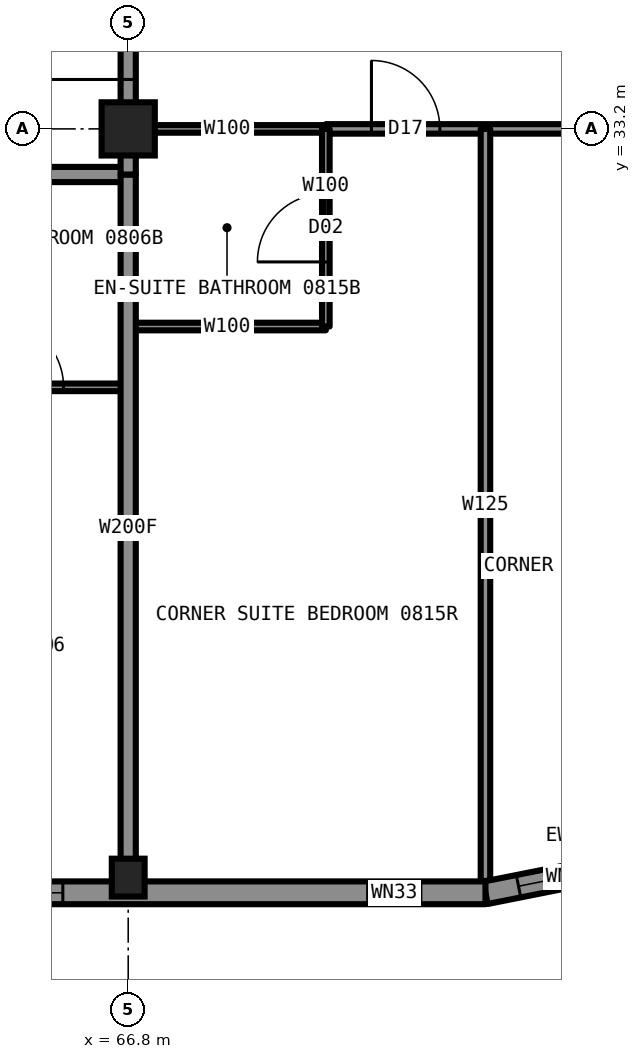
"""IFC4 building model, lengths in metres.
Left out: names, types, materials, properties, quantities, classifications, styles, units other than length and angle.
Written with IfcOpenShell. Run it as: python <this file> out.ifc"""

import sys

from ifc_helpers import new_model, si_unit, direction, frame, frame_2d, origin, origin_2d, place, context, subcontext, project, spatial, rectangle, hollow_rectangle, i_section, extrude, element, fill, save


model = new_model("IFC4")
c1 = context("Model", 3, precision=1e-05, world=origin(), true_north=direction((0.0, 1.0)))
c2 = subcontext(c1, "Body", "Model", "MODEL_VIEW")
j1 = project(units=[si_unit("LENGTHUNIT", "METRE"), si_unit("PLANEANGLEUNIT", "RADIAN")], contexts=[c1])
p1 = place(None, origin())
s1 = spatial("IfcSite", under=j1, at=p1, CompositionType="ELEMENT")
p2 = place(p1, origin())
s2 = spatial("IfcBuilding", under=s1, at=p2, CompositionType="ELEMENT")
p3 = place(p2, frame((0.0, 0.0, 28.5)))
s3 = spatial("IfcBuildingStorey", under=s2, at=p3, CompositionType="ELEMENT", Elevation=28.5)
p4 = place(p3, frame((66.8, 23.35, 0.0), z_axis=(0.0, 0.0, 1.0), x_axis=(1.0, 0.0, 0.0)))
e1 = element("IfcColumn", 1, at=p4, inside=s3, PredefinedType="COLUMN", context=c2, shape_type="SweptSolid", body=[
    extrude(i_section(OverallWidth=0.432, OverallDepth=0.498, WebThickness=0.056, FlangeThickness=0.089, at=origin_2d()), origin(), (0.0, 0.0, 1.0), 3.5),
])
p5 = place(p3, frame((66.8, 33.2, 0.0), z_axis=(0.0, 0.0, 1.0), x_axis=(1.0, 0.0, 0.0)))
e2 = element("IfcColumn", 2, at=p5, inside=s3, PredefinedType="COLUMN", context=c2, shape_type="SweptSolid", body=[
    extrude(hollow_rectangle(XDim=0.7, YDim=0.7, WallThickness=0.06, at=origin_2d()), origin(), (0.0, 0.0, 1.0), 3.5),
])
p6 = place(p3, frame((66.8, 33.2, 0.0), z_axis=(0.0, 0.0, 1.0), x_axis=(1.0, 0.0, 0.0)))
e3 = element("IfcWall", 3, at=p6, inside=s3, PredefinedType="PARTITIONING", context=c2, shape_type="SweptSolid", body=[
    extrude(rectangle(XDim=2.6, YDim=0.1, at=frame_2d((1.3, 0.0))), origin(), (0.0, 0.0, 1.0), 2.573),
])
p7 = place(p3, frame((69.4, 33.2, 0.0), z_axis=(0.0, 0.0, 1.0), x_axis=(1.0, 0.0, 0.0)))
e4 = element("IfcWall", 4, at=p7, inside=s3, PredefinedType="PARTITIONING", context=c2, shape_type="SweptSolid", body=[
    extrude(rectangle(XDim=7.3, YDim=0.125, at=frame_2d((3.65, 0.0))), origin(), (0.0, 0.0, 1.0), 2.573),
])
p8 = place(p7, frame((0.6, 0.0, 0.0)))
e5 = element("IfcOpeningElement", 5, at=p8, cuts=e4, PredefinedType="OPENING", context=c2, shape_type="SweptSolid", body=[
    extrude(rectangle(XDim=0.9, YDim=2.2, at=frame_2d((0.45, 1.1))), frame((0.0, 0.073, 0.0), z_axis=(0.0, -1.0, 0.0), x_axis=(1.0, 0.0, 0.0)), (0.0, 0.0, 1.0), 0.145),
])
p9 = place(p7, frame((4.4, 0.0, 0.0)))
e6 = element("IfcOpeningElement", 6, at=p9, cuts=e4, PredefinedType="OPENING", context=c2, shape_type="SweptSolid", body=[
    extrude(rectangle(XDim=0.9, YDim=2.2, at=frame_2d((0.45, 1.1))), frame((0.0, 0.073, 0.0), z_axis=(0.0, -1.0, 0.0), x_axis=(1.0, 0.0, 0.0)), (0.0, 0.0, 1.0), 0.145),
])
p10 = place(p3, frame((43.2, 32.6, 0.0), z_axis=(0.0, 0.0, 1.0), x_axis=(1.0, 0.0, 0.0)))
e7 = element("IfcWall", 7, at=p10, inside=s3, PredefinedType="PARTITIONING", context=c2, shape_type="SweptSolid", body=[
    extrude(rectangle(XDim=23.6, YDim=0.2, at=frame_2d((11.8, 0.0))), origin(), (0.0, 0.0, 1.0), 3.33),
])
p11 = place(p10, frame((1.85, 0.0, 0.0)))
e8 = element("IfcOpeningElement", 8, at=p11, cuts=e7, PredefinedType="OPENING", context=c2, shape_type="SweptSolid", body=[
    extrude(rectangle(XDim=1.1, YDim=2.2, at=frame_2d((0.55, 1.1))), frame((0.0, 0.11, 0.0), z_axis=(0.0, -1.0, 0.0), x_axis=(1.0, 0.0, 0.0)), (0.0, 0.0, 1.0), 0.22),
])
p12 = place(p10, frame((14.56, 0.0, 0.0)))
e9 = element("IfcOpeningElement", 9, at=p12, cuts=e7, PredefinedType="OPENING", context=c2, shape_type="SweptSolid", body=[
    extrude(rectangle(XDim=1.0, YDim=2.2, at=frame_2d((0.5, 1.1))), frame((0.0, 0.11, 0.0), z_axis=(0.0, -1.0, 0.0), x_axis=(1.0, 0.0, 0.0)), (0.0, 0.0, 1.0), 0.22),
])
p13 = place(p10, frame((19.28, 0.0, 0.0)))
e10 = element("IfcOpeningElement", 10, at=p13, cuts=e7, PredefinedType="OPENING", context=c2, shape_type="SweptSolid", body=[
    extrude(rectangle(XDim=1.0, YDim=2.2, at=frame_2d((0.5, 1.1))), frame((0.0, 0.11, 0.0), z_axis=(0.0, -1.0, 0.0), x_axis=(1.0, 0.0, 0.0)), (0.0, 0.0, 1.0), 0.22),
])
p14 = place(p3, frame((66.8, 30.6, 0.0), z_axis=(0.0, 0.0, 1.0), x_axis=(1.0, 0.0, 0.0)))
e11 = element("IfcWall", 11, at=p14, inside=s3, PredefinedType="PARTITIONING", context=c2, shape_type="SweptSolid", body=[
    extrude(rectangle(XDim=2.6, YDim=0.1, at=frame_2d((1.3, 0.0))), origin(), (0.0, 0.0, 1.0), 3.33),
])
p15 = place(p3, frame((64.2, 29.8, 0.0), z_axis=(0.0, 0.0, 1.0), x_axis=(1.0, 0.0, 0.0)))
e12 = element("IfcWall", 12, at=p15, inside=s3, PredefinedType="PARTITIONING", context=c2, shape_type="SweptSolid", body=[
    extrude(rectangle(XDim=2.6, YDim=0.1, at=frame_2d((1.3, 0.0))), origin(), (0.0, 0.0, 1.0), 3.33),
])
p16 = place(p15, frame((0.85, 0.0, 0.0)))
e13 = element("IfcOpeningElement", 13, at=p16, cuts=e12, PredefinedType="OPENING", context=c2, shape_type="SweptSolid", body=[
    extrude(rectangle(XDim=0.9, YDim=2.1, at=frame_2d((0.45, 1.05))), frame((0.0, 0.06, 0.0), z_axis=(0.0, -1.0, 0.0), x_axis=(1.0, 0.0, 0.0)), (0.0, 0.0, 1.0), 0.12),
])
p17 = place(p3, frame((66.8, 33.22, 0.0), z_axis=(0.0, 0.0, 1.0), x_axis=(0.0, 1.0, 0.0)))
e14 = element("IfcWall", 14, at=p17, inside=s3, PredefinedType="PARTITIONING", context=c2, shape_type="SweptSolid", body=[
    extrude(rectangle(XDim=23.56, YDim=0.2, at=frame_2d((11.78, 0.0))), origin(), (0.0, 0.0, 1.0), 3.33),
])
p18 = place(p17, frame((7.85, 0.0, 0.0)))
e15 = element("IfcOpeningElement", 15, at=p18, cuts=e14, PredefinedType="OPENING", context=c2, shape_type="SweptSolid", body=[
    extrude(rectangle(XDim=1.0, YDim=2.2, at=frame_2d((0.5, 1.1))), frame((0.0, 0.11, 0.0), z_axis=(0.0, -1.0, 0.0), x_axis=(1.0, 0.0, 0.0)), (0.0, 0.0, 1.0), 0.22),
])
p19 = place(p17, frame((12.42, 0.0, 0.0)))
e16 = element("IfcOpeningElement", 16, at=p19, cuts=e14, PredefinedType="OPENING", context=c2, shape_type="SweptSolid", body=[
    extrude(rectangle(XDim=1.0, YDim=2.2, at=frame_2d((0.5, 1.1))), frame((0.0, 0.11, 0.0), z_axis=(0.0, -1.0, 0.0), x_axis=(1.0, 0.0, 0.0)), (0.0, 0.0, 1.0), 0.22),
])
p20 = place(p17, frame((21.83, 0.0, 0.0)))
e17 = element("IfcOpeningElement", 17, at=p20, cuts=e14, PredefinedType="OPENING", context=c2, shape_type="SweptSolid", body=[
    extrude(rectangle(XDim=1.1, YDim=2.2, at=frame_2d((0.55, 1.1))), frame((0.0, 0.11, 0.0), z_axis=(0.0, -1.0, 0.0), x_axis=(1.0, 0.0, 0.0)), (0.0, 0.0, 1.0), 0.22),
])
p21 = place(p17, frame((0.63, 0.0, 0.0)))
e18 = element("IfcOpeningElement", 18, at=p21, cuts=e14, PredefinedType="OPENING", context=c2, shape_type="SweptSolid", body=[
    extrude(rectangle(XDim=1.1, YDim=2.2, at=frame_2d((0.55, 1.1))), frame((0.0, 0.11, 0.0), z_axis=(0.0, -1.0, 0.0), x_axis=(1.0, 0.0, 0.0)), (0.0, 0.0, 1.0), 0.22),
])
p22 = place(p3, frame((66.8, 23.3, 0.0), z_axis=(0.0, 0.0, 1.0), x_axis=(0.0, 1.0, 0.0)))
e19 = element("IfcWall", 19, at=p22, inside=s3, PredefinedType="PARTITIONING", context=c2, shape_type="SweptSolid", body=[
    extrude(rectangle(XDim=9.3, YDim=0.2, at=frame_2d((4.65, 0.0))), origin(), (0.0, 0.0, 1.0), 2.573),
])
p23 = place(p3, frame((69.4, 30.6, 0.0), z_axis=(0.0, 0.0, 1.0), x_axis=(0.0, 1.0, 0.0)))
e20 = element("IfcWall", 20, at=p23, inside=s3, PredefinedType="PARTITIONING", context=c2, shape_type="SweptSolid", body=[
    extrude(rectangle(XDim=2.6, YDim=0.1, at=frame_2d((1.3, 0.0))), origin(), (0.0, 0.0, 1.0), 3.33),
])
p24 = place(p23, frame((0.85, 0.0, 0.0)))
e21 = element("IfcOpeningElement", 21, at=p24, cuts=e20, PredefinedType="OPENING", context=c2, shape_type="SweptSolid", body=[
    extrude(rectangle(XDim=0.9, YDim=2.1, at=frame_2d((0.45, 1.05))), frame((0.0, 0.06, 0.0), z_axis=(0.0, -1.0, 0.0), x_axis=(1.0, 0.0, 0.0)), (0.0, 0.0, 1.0), 0.12),
])
p25 = place(p3, frame((71.5, 23.306, 0.0), z_axis=(0.0, 0.0, 1.0), x_axis=(0.0, 1.0, 0.0)))
e22 = element("IfcWall", 22, at=p25, inside=s3, PredefinedType="PARTITIONING", context=c2, shape_type="SweptSolid", body=[
    extrude(rectangle(XDim=9.894, YDim=0.125, at=frame_2d((4.947, 0.0))), origin(), (0.0, 0.0, 1.0), 3.33),
])
p26 = place(p3, frame((71.5, 23.15, 0.0), z_axis=(0.0, 0.0, 1.0), x_axis=(0.980787050784, 0.195081421501, 0.0)))
e23 = element("IfcWall", 23, at=p26, inside=s3, PredefinedType="SOLIDWALL", context=c2, shape_type="SweptSolid", body=[
    extrude(rectangle(XDim=2.087, YDim=0.3, at=frame_2d((1.044, 0.0))), origin(), (0.0, 0.0, 1.0), 3.33),
])
p27 = place(p26, frame((0.444, 0.0, 0.5)))
e24 = element("IfcOpeningElement", 24, at=p27, cuts=e23, PredefinedType="OPENING", context=c2, shape_type="SweptSolid", body=[
    extrude(rectangle(XDim=0.8, YDim=1.1, at=frame_2d((0.4, 0.55))), frame((0.0, 0.16, 0.0), z_axis=(0.0, -1.0, 0.0), x_axis=(1.0, 0.0, 0.0)), (0.0, 0.0, 1.0), 0.32),
])
p28 = place(p3, frame((38.5, 23.15, 0.0), z_axis=(0.0, 0.0, 1.0), x_axis=(1.0, 0.0, 0.0)))
e25 = element("IfcWall", 25, at=p28, inside=s3, PredefinedType="SOLIDWALL", context=c2, shape_type="SweptSolid", body=[
    extrude(rectangle(XDim=33.0, YDim=0.3, at=frame_2d((16.5, 0.0))), origin(), (0.0, 0.0, 1.0), 2.83),
])
p29 = place(p28, frame((0.85, 0.0, 0.5)))
e26 = element("IfcOpeningElement", 26, at=p29, cuts=e25, PredefinedType="OPENING", context=c2, shape_type="SweptSolid", body=[
    extrude(rectangle(XDim=3.0, YDim=2.0, at=frame_2d((1.5, 1.0))), frame((0.0, 0.16, 0.0), z_axis=(0.0, -1.0, 0.0), x_axis=(1.0, 0.0, 0.0)), (0.0, 0.0, 1.0), 0.32),
])
p30 = place(p28, frame((5.56, 0.0, 0.5)))
e27 = element("IfcOpeningElement", 27, at=p30, cuts=e25, PredefinedType="OPENING", context=c2, shape_type="SweptSolid", body=[
    extrude(rectangle(XDim=3.0, YDim=2.0, at=frame_2d((1.5, 1.0))), frame((0.0, 0.16, 0.0), z_axis=(0.0, -1.0, 0.0), x_axis=(1.0, 0.0, 0.0)), (0.0, 0.0, 1.0), 0.32),
])
p31 = place(p28, frame((10.28, 0.0, 0.5)))
e28 = element("IfcOpeningElement", 28, at=p31, cuts=e25, PredefinedType="OPENING", context=c2, shape_type="SweptSolid", body=[
    extrude(rectangle(XDim=3.0, YDim=2.0, at=frame_2d((1.5, 1.0))), frame((0.0, 0.16, 0.0), z_axis=(0.0, -1.0, 0.0), x_axis=(1.0, 0.0, 0.0)), (0.0, 0.0, 1.0), 0.32),
])
p32 = place(p28, frame((15.0, 0.0, 0.5)))
e29 = element("IfcOpeningElement", 29, at=p32, cuts=e25, PredefinedType="OPENING", context=c2, shape_type="SweptSolid", body=[
    extrude(rectangle(XDim=3.0, YDim=2.0, at=frame_2d((1.5, 1.0))), frame((0.0, 0.16, 0.0), z_axis=(0.0, -1.0, 0.0), x_axis=(1.0, 0.0, 0.0)), (0.0, 0.0, 1.0), 0.32),
])
p33 = place(p28, frame((19.72, 0.0, 0.5)))
e30 = element("IfcOpeningElement", 30, at=p33, cuts=e25, PredefinedType="OPENING", context=c2, shape_type="SweptSolid", body=[
    extrude(rectangle(XDim=3.0, YDim=2.0, at=frame_2d((1.5, 1.0))), frame((0.0, 0.16, 0.0), z_axis=(0.0, -1.0, 0.0), x_axis=(1.0, 0.0, 0.0)), (0.0, 0.0, 1.0), 0.32),
])
p34 = place(p28, frame((24.44, 0.0, 0.5)))
e31 = element("IfcOpeningElement", 31, at=p34, cuts=e25, PredefinedType="OPENING", context=c2, shape_type="SweptSolid", body=[
    extrude(rectangle(XDim=3.0, YDim=2.0, at=frame_2d((1.5, 1.0))), frame((0.0, 0.16, 0.0), z_axis=(0.0, -1.0, 0.0), x_axis=(1.0, 0.0, 0.0)), (0.0, 0.0, 1.0), 0.32),
])
p35 = place(p28, frame((29.15, 0.0, 0.5)))
e32 = element("IfcOpeningElement", 32, at=p35, cuts=e25, PredefinedType="OPENING", context=c2, shape_type="SweptSolid", body=[
    extrude(rectangle(XDim=3.0, YDim=2.0, at=frame_2d((1.5, 1.0))), frame((0.0, 0.16, 0.0), z_axis=(0.0, -1.0, 0.0), x_axis=(1.0, 0.0, 0.0)), (0.0, 0.0, 1.0), 0.32),
])
p36 = place(p3, frame((66.8, 32.6, 0.0), z_axis=(0.0, 0.0, 1.0), x_axis=(0.0, 1.0, 0.0)))
e33 = element("IfcWall", 33, at=p36, inside=s3, PredefinedType="PARTITIONING", context=c2, shape_type="SweptSolid", body=[
    extrude(rectangle(XDim=0.62, YDim=0.2, at=frame_2d((0.31, 0.0))), origin(), (0.0, 0.0, 1.0), 2.573),
])
p37 = place(p16, origin())
e34 = element("IfcDoor", 34, at=p37, inside=s3, OperationType="SINGLE_SWING_RIGHT", PredefinedType="DOOR", context=c2, shape_type="SweptSolid", body=[
    extrude(rectangle(XDim=0.9, YDim=2.1, at=frame_2d((0.45, 1.05))), frame((0.0, 0.025, 0.0), z_axis=(0.0, -1.0, 0.0), x_axis=(1.0, 0.0, 0.0)), (0.0, 0.0, 1.0), 0.05),
])
fill(e13, e34)
p38 = place(p21, origin())
e35 = element("IfcDoor", 35, at=p38, inside=s3, OperationType="SINGLE_SWING_LEFT", PredefinedType="DOOR", context=c2, shape_type="SweptSolid", body=[
    extrude(rectangle(XDim=1.1, YDim=2.2, at=frame_2d((0.55, 1.1))), frame((0.0, 0.025, 0.0), z_axis=(0.0, -1.0, 0.0), x_axis=(1.0, 0.0, 0.0)), (0.0, 0.0, 1.0), 0.05),
])
fill(e18, e35)
p39 = place(p24, origin())
e36 = element("IfcDoor", 36, at=p39, inside=s3, OperationType="SINGLE_SWING_RIGHT", PredefinedType="DOOR", context=c2, shape_type="SweptSolid", body=[
    extrude(rectangle(XDim=0.9, YDim=2.1, at=frame_2d((0.45, 1.05))), frame((0.0, 0.025, 0.0), z_axis=(0.0, -1.0, 0.0), x_axis=(1.0, 0.0, 0.0)), (0.0, 0.0, 1.0), 0.05),
])
fill(e21, e36)
p40 = place(p8, origin())
e37 = element("IfcDoor", 37, at=p40, inside=s3, OperationType="SINGLE_SWING_LEFT", PredefinedType="DOOR", context=c2, shape_type="SweptSolid", body=[
    extrude(rectangle(XDim=0.9, YDim=2.2, at=frame_2d((0.45, 1.1))), frame((0.0, 0.025, 0.0), z_axis=(0.0, -1.0, 0.0), x_axis=(1.0, 0.0, 0.0)), (0.0, 0.0, 1.0), 0.05),
])
fill(e5, e37)
p41 = place(p27, origin())
e38 = element("IfcWindow", 38, at=p41, inside=s3, PartitioningType="SINGLE_PANEL", PredefinedType="WINDOW", context=c2, shape_type="SweptSolid", body=[
    extrude(rectangle(XDim=0.8, YDim=1.1, at=frame_2d((0.4, 0.55))), frame((0.0, 0.03, 0.0), z_axis=(0.0, -1.0, 0.0), x_axis=(1.0, 0.0, 0.0)), (0.0, 0.0, 1.0), 0.06),
])
fill(e24, e38)
p42 = place(p34, origin())
e39 = element("IfcWindow", 39, at=p42, inside=s3, PartitioningType="SINGLE_PANEL", PredefinedType="WINDOW", context=c2, shape_type="SweptSolid", body=[
    extrude(rectangle(XDim=3.0, YDim=2.0, at=frame_2d((1.5, 1.0))), frame((0.0, 0.03, 0.0), z_axis=(0.0, -1.0, 0.0), x_axis=(1.0, 0.0, 0.0)), (0.0, 0.0, 1.0), 0.06),
])
fill(e31, e39)
p43 = place(p35, origin())
e40 = element("IfcWindow", 40, at=p43, inside=s3, PartitioningType="SINGLE_PANEL", PredefinedType="WINDOW", context=c2, shape_type="SweptSolid", body=[
    extrude(rectangle(XDim=3.0, YDim=2.0, at=frame_2d((1.5, 1.0))), frame((0.0, 0.03, 0.0), z_axis=(0.0, -1.0, 0.0), x_axis=(1.0, 0.0, 0.0)), (0.0, 0.0, 1.0), 0.06),
])
fill(e32, e40)
save(model, sys.argv[1])
